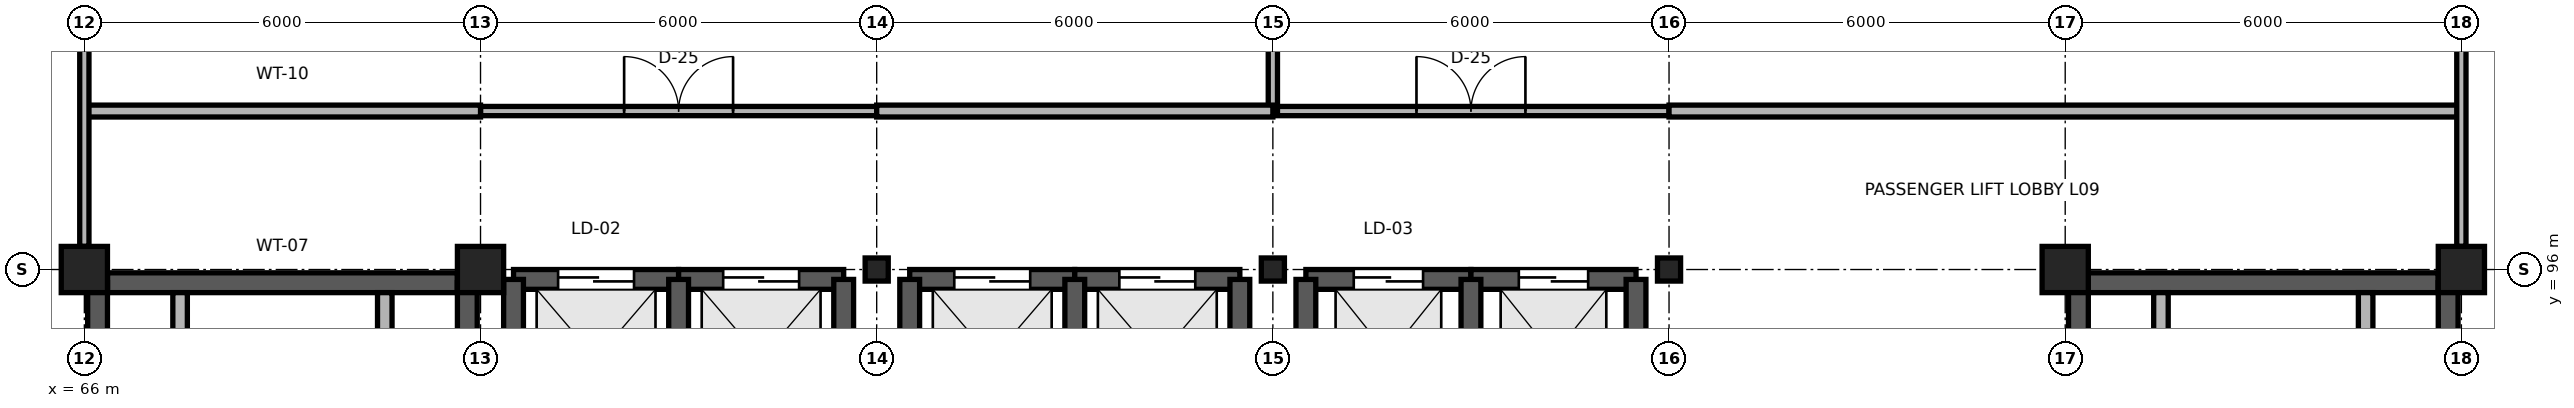
"""IFC4 building model, lengths in metres.
Left out: names, types, materials, properties, quantities, classifications, styles, units other than length and angle.
Written with IfcOpenShell. Run it as: python <this file> out.ifc"""

import sys

from ifc_helpers import new_model, si_unit, direction, frame, frame_2d, origin, origin_2d, place, context, subcontext, project, spatial, rectangle, i_section, extrude, element, fill, save


model = new_model("IFC4")
c1 = context("Model", 3, precision=1e-05, world=origin(), true_north=direction((0.0, 1.0)))
c2 = subcontext(c1, "Body", "Model", "MODEL_VIEW")
j1 = project(units=[si_unit("LENGTHUNIT", "METRE"), si_unit("PLANEANGLEUNIT", "RADIAN")], contexts=[c1])
p1 = place(None, origin())
s1 = spatial("IfcSite", under=j1, at=p1, CompositionType="ELEMENT")
p2 = place(p1, origin())
s2 = spatial("IfcBuilding", under=s1, at=p2, CompositionType="ELEMENT")
p3 = place(p2, frame((0.0, 0.0, 36.6)))
s3 = spatial("IfcBuildingStorey", under=s2, at=p3, CompositionType="ELEMENT", Elevation=36.6)
for number, where, z_axis, x_axis in (
    (1, (66.0, 96.0, 0.0), (0.0, 0.0, 1.0), (1.0, 0.0, 0.0)),
    (2, (72.0, 96.0, 0.0), (0.0, 0.0, 1.0), (1.0, 0.0, 0.0)),
):
    element("IfcColumn", number, at=place(p3, frame(where, z_axis=z_axis, x_axis=x_axis)), inside=s3, PredefinedType="COLUMN", context=c2, shape_type="SweptSolid", body=[
        extrude(rectangle(XDim=0.7, YDim=0.7, at=origin_2d()), origin(), (0.0, 0.0, 1.0), 3.9),
    ])
for number, where, z_axis, x_axis in (
    (3, (78.0, 96.0, 0.0), (0.0, 0.0, 1.0), (1.0, 0.0, 0.0)),
    (4, (84.0, 96.0, 0.0), (0.0, 0.0, 1.0), (1.0, 0.0, 0.0)),
    (5, (90.0, 96.0, 0.0), (0.0, 0.0, 1.0), (1.0, 0.0, 0.0)),
):
    element("IfcColumn", number, at=place(p3, frame(where, z_axis=z_axis, x_axis=x_axis)), inside=s3, PredefinedType="COLUMN", context=c2, shape_type="SweptSolid", body=[
        extrude(i_section(OverallWidth=0.35, OverallDepth=0.35, WebThickness=0.012, FlangeThickness=0.019, FilletRadius=0.02, at=origin_2d()), origin(), (0.0, 0.0, 1.0), 3.9),
    ])
for number, where, z_axis, x_axis in (
    (6, (96.0, 96.0, 0.0), (0.0, 0.0, 1.0), (1.0, 0.0, 0.0)),
    (7, (102.0, 96.0, 0.0), (0.0, 0.0, 1.0), (1.0, 0.0, 0.0)),
):
    element("IfcColumn", number, at=place(p3, frame(where, z_axis=z_axis, x_axis=x_axis)), inside=s3, PredefinedType="COLUMN", context=c2, shape_type="SweptSolid", body=[
        extrude(rectangle(XDim=0.7, YDim=0.7, at=origin_2d()), origin(), (0.0, 0.0, 1.0), 3.9),
    ])
p4 = place(p3, frame((66.35, 95.8, 0.0), z_axis=(0.0, 0.0, 1.0), x_axis=(1.0, 0.0, 0.0)))
e8 = element("IfcWall", 8, at=p4, inside=s3, PredefinedType="SHEAR", context=c2, shape_type="SweptSolid", body=[
    extrude(rectangle(XDim=5.3, YDim=0.3, at=frame_2d((2.65, 0.0))), origin(), (0.0, 0.0, 1.0), 3.74),
])
for number, where, z_axis, x_axis in (
    (9, (66.2, 84.0, 0.0), (0.0, 0.0, 1.0), (0.0, 1.0, 0.0)),
    (10, (71.8, 84.0, 0.0), (0.0, 0.0, 1.0), (0.0, 1.0, 0.0)),
):
    element("IfcWall", number, at=place(p3, frame(where, z_axis=z_axis, x_axis=x_axis)), inside=s3, PredefinedType="SHEAR", context=c2, shape_type="SweptSolid", body=[
        extrude(rectangle(XDim=11.8, YDim=0.3, at=frame_2d((5.9, 0.0))), origin(), (0.0, 0.0, 1.0), 3.74),
    ])
for number, where, z_axis, x_axis in (
    (11, (67.45, 94.4, 0.0), (0.0, 0.0, 1.0), (0.0, 1.0, 0.0)),
    (12, (70.55, 94.4, 0.0), (0.0, 0.0, 1.0), (0.0, 1.0, 0.0)),
):
    element("IfcWall", number, at=place(p3, frame(where, z_axis=z_axis, x_axis=x_axis)), inside=s3, PredefinedType="PARTITIONING", context=c2, shape_type="SweptSolid", body=[
        extrude(rectangle(XDim=1.25, YDim=0.22, at=frame_2d((0.625, 0.0))), origin(), (0.0, 0.0, 1.0), 3.74),
    ])
p5 = place(p3, frame((96.35, 95.8, 0.0), z_axis=(0.0, 0.0, 1.0), x_axis=(1.0, 0.0, 0.0)))
e13 = element("IfcWall", 13, at=p5, inside=s3, PredefinedType="SHEAR", context=c2, shape_type="SweptSolid", body=[
    extrude(rectangle(XDim=5.3, YDim=0.3, at=frame_2d((2.65, 0.0))), origin(), (0.0, 0.0, 1.0), 3.74),
])
for number, where, z_axis, x_axis in (
    (14, (96.2, 84.0, 0.0), (0.0, 0.0, 1.0), (0.0, 1.0, 0.0)),
    (15, (101.8, 84.0, 0.0), (0.0, 0.0, 1.0), (0.0, 1.0, 0.0)),
):
    element("IfcWall", number, at=place(p3, frame(where, z_axis=z_axis, x_axis=x_axis)), inside=s3, PredefinedType="SHEAR", context=c2, shape_type="SweptSolid", body=[
        extrude(rectangle(XDim=11.8, YDim=0.3, at=frame_2d((5.9, 0.0))), origin(), (0.0, 0.0, 1.0), 3.74),
    ])
for number, where, z_axis, x_axis in (
    (16, (97.45, 94.4, 0.0), (0.0, 0.0, 1.0), (0.0, 1.0, 0.0)),
    (17, (100.55, 94.4, 0.0), (0.0, 0.0, 1.0), (0.0, 1.0, 0.0)),
):
    element("IfcWall", number, at=place(p3, frame(where, z_axis=z_axis, x_axis=x_axis)), inside=s3, PredefinedType="PARTITIONING", context=c2, shape_type="SweptSolid", body=[
        extrude(rectangle(XDim=1.25, YDim=0.22, at=frame_2d((0.625, 0.0))), origin(), (0.0, 0.0, 1.0), 3.74),
    ])
p6 = place(p3, frame((72.5, 95.85, 0.0), z_axis=(0.0, 0.0, 1.0), x_axis=(1.0, 0.0, 0.0)))
e18 = element("IfcWall", 18, at=p6, inside=s3, PredefinedType="SHEAR", context=c2, shape_type="SweptSolid", body=[
    extrude(rectangle(XDim=2.5, YDim=0.3, at=frame_2d((1.25, 0.0))), origin(), (0.0, 0.0, 1.0), 3.74),
])
p7 = place(p6, frame((0.675, 0.0, 0.0)))
e19 = element("IfcOpeningElement", 19, at=p7, cuts=e18, PredefinedType="OPENING", context=c2, shape_type="SweptSolid", body=[
    extrude(rectangle(XDim=1.15, YDim=2.15, at=frame_2d((0.575, 1.075))), frame((0.0, 0.165, 0.0), z_axis=(0.0, -1.0, 0.0), x_axis=(1.0, 0.0, 0.0)), (0.0, 0.0, 1.0), 0.33),
])
p8 = place(p3, frame((72.5, 92.45, 0.0), z_axis=(0.0, 0.0, 1.0), x_axis=(0.0, 1.0, 0.0)))
e20 = element("IfcWall", 20, at=p8, inside=s3, PredefinedType="SHEAR", context=c2, shape_type="SweptSolid", body=[
    extrude(rectangle(XDim=3.4, YDim=0.3, at=frame_2d((1.7, 0.0))), origin(), (0.0, 0.0, 1.0), 3.74),
])
p9 = place(p3, frame((75.0, 95.85, 0.0), z_axis=(0.0, 0.0, 1.0), x_axis=(1.0, 0.0, 0.0)))
e21 = element("IfcWall", 21, at=p9, inside=s3, PredefinedType="SHEAR", context=c2, shape_type="SweptSolid", body=[
    extrude(rectangle(XDim=2.5, YDim=0.3, at=frame_2d((1.25, 0.0))), origin(), (0.0, 0.0, 1.0), 3.74),
])
p10 = place(p9, frame((0.675, 0.0, 0.0)))
e22 = element("IfcOpeningElement", 22, at=p10, cuts=e21, PredefinedType="OPENING", context=c2, shape_type="SweptSolid", body=[
    extrude(rectangle(XDim=1.15, YDim=2.15, at=frame_2d((0.575, 1.075))), frame((0.0, 0.165, 0.0), z_axis=(0.0, -1.0, 0.0), x_axis=(1.0, 0.0, 0.0)), (0.0, 0.0, 1.0), 0.33),
])
for number, where, z_axis, x_axis in (
    (23, (75.0, 92.45, 0.0), (0.0, 0.0, 1.0), (0.0, 1.0, 0.0)),
    (24, (77.5, 92.45, 0.0), (0.0, 0.0, 1.0), (0.0, 1.0, 0.0)),
):
    element("IfcWall", number, at=place(p3, frame(where, z_axis=z_axis, x_axis=x_axis)), inside=s3, PredefinedType="SHEAR", context=c2, shape_type="SweptSolid", body=[
        extrude(rectangle(XDim=3.4, YDim=0.3, at=frame_2d((1.7, 0.0))), origin(), (0.0, 0.0, 1.0), 3.74),
    ])
p11 = place(p3, frame((78.5, 95.85, 0.0), z_axis=(0.0, 0.0, 1.0), x_axis=(1.0, 0.0, 0.0)))
e25 = element("IfcWall", 25, at=p11, inside=s3, PredefinedType="SHEAR", context=c2, shape_type="SweptSolid", body=[
    extrude(rectangle(XDim=2.5, YDim=0.3, at=frame_2d((1.25, 0.0))), origin(), (0.0, 0.0, 1.0), 3.74),
])
p12 = place(p11, frame((0.675, 0.0, 0.0)))
e26 = element("IfcOpeningElement", 26, at=p12, cuts=e25, PredefinedType="OPENING", context=c2, shape_type="SweptSolid", body=[
    extrude(rectangle(XDim=1.15, YDim=2.15, at=frame_2d((0.575, 1.075))), frame((0.0, 0.165, 0.0), z_axis=(0.0, -1.0, 0.0), x_axis=(1.0, 0.0, 0.0)), (0.0, 0.0, 1.0), 0.33),
])
p13 = place(p3, frame((78.5, 92.45, 0.0), z_axis=(0.0, 0.0, 1.0), x_axis=(0.0, 1.0, 0.0)))
e27 = element("IfcWall", 27, at=p13, inside=s3, PredefinedType="SHEAR", context=c2, shape_type="SweptSolid", body=[
    extrude(rectangle(XDim=3.4, YDim=0.3, at=frame_2d((1.7, 0.0))), origin(), (0.0, 0.0, 1.0), 3.74),
])
p14 = place(p3, frame((81.0, 95.85, 0.0), z_axis=(0.0, 0.0, 1.0), x_axis=(1.0, 0.0, 0.0)))
e28 = element("IfcWall", 28, at=p14, inside=s3, PredefinedType="SHEAR", context=c2, shape_type="SweptSolid", body=[
    extrude(rectangle(XDim=2.5, YDim=0.3, at=frame_2d((1.25, 0.0))), origin(), (0.0, 0.0, 1.0), 3.74),
])
p15 = place(p14, frame((0.675, 0.0, 0.0)))
e29 = element("IfcOpeningElement", 29, at=p15, cuts=e28, PredefinedType="OPENING", context=c2, shape_type="SweptSolid", body=[
    extrude(rectangle(XDim=1.15, YDim=2.15, at=frame_2d((0.575, 1.075))), frame((0.0, 0.165, 0.0), z_axis=(0.0, -1.0, 0.0), x_axis=(1.0, 0.0, 0.0)), (0.0, 0.0, 1.0), 0.33),
])
for number, where, z_axis, x_axis in (
    (30, (81.0, 92.45, 0.0), (0.0, 0.0, 1.0), (0.0, 1.0, 0.0)),
    (31, (83.5, 92.45, 0.0), (0.0, 0.0, 1.0), (0.0, 1.0, 0.0)),
):
    element("IfcWall", number, at=place(p3, frame(where, z_axis=z_axis, x_axis=x_axis)), inside=s3, PredefinedType="SHEAR", context=c2, shape_type="SweptSolid", body=[
        extrude(rectangle(XDim=3.4, YDim=0.3, at=frame_2d((1.7, 0.0))), origin(), (0.0, 0.0, 1.0), 3.74),
    ])
p16 = place(p3, frame((84.5, 95.85, 0.0), z_axis=(0.0, 0.0, 1.0), x_axis=(1.0, 0.0, 0.0)))
e32 = element("IfcWall", 32, at=p16, inside=s3, PredefinedType="SHEAR", context=c2, shape_type="SweptSolid", body=[
    extrude(rectangle(XDim=2.5, YDim=0.3, at=frame_2d((1.25, 0.0))), origin(), (0.0, 0.0, 1.0), 3.74),
])
p17 = place(p16, frame((0.725, 0.0, 0.0)))
e33 = element("IfcOpeningElement", 33, at=p17, cuts=e32, PredefinedType="OPENING", context=c2, shape_type="SweptSolid", body=[
    extrude(rectangle(XDim=1.05, YDim=2.1, at=frame_2d((0.525, 1.05))), frame((0.0, 0.165, 0.0), z_axis=(0.0, -1.0, 0.0), x_axis=(1.0, 0.0, 0.0)), (0.0, 0.0, 1.0), 0.33),
])
p18 = place(p3, frame((84.5, 92.45, 0.0), z_axis=(0.0, 0.0, 1.0), x_axis=(0.0, 1.0, 0.0)))
e34 = element("IfcWall", 34, at=p18, inside=s3, PredefinedType="SHEAR", context=c2, shape_type="SweptSolid", body=[
    extrude(rectangle(XDim=3.4, YDim=0.3, at=frame_2d((1.7, 0.0))), origin(), (0.0, 0.0, 1.0), 3.74),
])
p19 = place(p3, frame((87.0, 95.85, 0.0), z_axis=(0.0, 0.0, 1.0), x_axis=(1.0, 0.0, 0.0)))
e35 = element("IfcWall", 35, at=p19, inside=s3, PredefinedType="SHEAR", context=c2, shape_type="SweptSolid", body=[
    extrude(rectangle(XDim=2.5, YDim=0.3, at=frame_2d((1.25, 0.0))), origin(), (0.0, 0.0, 1.0), 3.74),
])
p20 = place(p19, frame((0.725, 0.0, 0.0)))
e36 = element("IfcOpeningElement", 36, at=p20, cuts=e35, PredefinedType="OPENING", context=c2, shape_type="SweptSolid", body=[
    extrude(rectangle(XDim=1.05, YDim=2.1, at=frame_2d((0.525, 1.05))), frame((0.0, 0.165, 0.0), z_axis=(0.0, -1.0, 0.0), x_axis=(1.0, 0.0, 0.0)), (0.0, 0.0, 1.0), 0.33),
])
for number, where, z_axis, x_axis in (
    (37, (87.0, 92.45, 0.0), (0.0, 0.0, 1.0), (0.0, 1.0, 0.0)),
    (38, (89.5, 92.45, 0.0), (0.0, 0.0, 1.0), (0.0, 1.0, 0.0)),
):
    element("IfcWall", number, at=place(p3, frame(where, z_axis=z_axis, x_axis=x_axis)), inside=s3, PredefinedType="SHEAR", context=c2, shape_type="SweptSolid", body=[
        extrude(rectangle(XDim=3.4, YDim=0.3, at=frame_2d((1.7, 0.0))), origin(), (0.0, 0.0, 1.0), 3.74),
    ])
p21 = place(p3, frame((72.0, 98.4, 0.0), z_axis=(0.0, 0.0, 1.0), x_axis=(1.0, 0.0, 0.0)))
e39 = element("IfcWall", 39, at=p21, inside=s3, PredefinedType="PARTITIONING", context=c2, shape_type="SweptSolid", body=[
    extrude(rectangle(XDim=6.0, YDim=0.14, at=frame_2d((3.0, 0.0))), origin(), (0.0, 0.0, 1.0), 3.74),
])
p22 = place(p21, frame((2.175, 0.0, 0.0)))
e40 = element("IfcOpeningElement", 40, at=p22, cuts=e39, PredefinedType="OPENING", context=c2, shape_type="SweptSolid", body=[
    extrude(rectangle(XDim=1.65, YDim=2.35, at=frame_2d((0.825, 1.175))), frame((0.0, 0.085, 0.0), z_axis=(0.0, -1.0, 0.0), x_axis=(1.0, 0.0, 0.0)), (0.0, 0.0, 1.0), 0.17),
])
p23 = place(p3, frame((84.0, 98.4, 0.0), z_axis=(0.0, 0.0, 1.0), x_axis=(1.0, 0.0, 0.0)))
e41 = element("IfcWall", 41, at=p23, inside=s3, PredefinedType="PARTITIONING", context=c2, shape_type="SweptSolid", body=[
    extrude(rectangle(XDim=6.0, YDim=0.14, at=frame_2d((3.0, 0.0))), origin(), (0.0, 0.0, 1.0), 3.74),
])
p24 = place(p23, frame((2.175, 0.0, 0.0)))
e42 = element("IfcOpeningElement", 42, at=p24, cuts=e41, PredefinedType="OPENING", context=c2, shape_type="SweptSolid", body=[
    extrude(rectangle(XDim=1.65, YDim=2.35, at=frame_2d((0.825, 1.175))), frame((0.0, 0.085, 0.0), z_axis=(0.0, -1.0, 0.0), x_axis=(1.0, 0.0, 0.0)), (0.0, 0.0, 1.0), 0.17),
])
p25 = place(p3, frame((84.0, 98.4, 0.0), z_axis=(0.0, 0.0, 1.0), x_axis=(0.0, 1.0, 0.0)))
e43 = element("IfcWall", 43, at=p25, inside=s3, PredefinedType="PARTITIONING", context=c2, shape_type="SweptSolid", body=[
    extrude(rectangle(XDim=2.95, YDim=0.14, at=frame_2d((1.475, 0.0))), origin(), (0.0, 0.0, 1.0), 3.348),
])
for number, where, z_axis, x_axis in (
    (44, (66.0, 98.4, 0.0), (0.0, 0.0, 1.0), (1.0, 0.0, 0.0)),
    (45, (78.0, 98.4, 0.0), (0.0, 0.0, 1.0), (1.0, 0.0, 0.0)),
):
    element("IfcWall", number, at=place(p3, frame(where, z_axis=z_axis, x_axis=x_axis)), inside=s3, PredefinedType="PARTITIONING", context=c2, shape_type="SweptSolid", body=[
        extrude(rectangle(XDim=6.0, YDim=0.18, at=frame_2d((3.0, 0.0))), origin(), (0.0, 0.0, 1.0), 3.74),
    ])
p26 = place(p3, frame((90.0, 98.4, 0.0), z_axis=(0.0, 0.0, 1.0), x_axis=(1.0, 0.0, 0.0)))
e46 = element("IfcWall", 46, at=p26, inside=s3, PredefinedType="PARTITIONING", context=c2, shape_type="SweptSolid", body=[
    extrude(rectangle(XDim=12.0, YDim=0.18, at=frame_2d((6.0, 0.0))), origin(), (0.0, 0.0, 1.0), 3.74),
])
for number, where, z_axis, x_axis in (
    (47, (66.0, 96.35, 0.0), (0.0, 0.0, 1.0), (0.0, 1.0, 0.0)),
    (48, (102.0, 96.35, 0.0), (0.0, 0.0, 1.0), (0.0, 1.0, 0.0)),
):
    element("IfcWall", number, at=place(p3, frame(where, z_axis=z_axis, x_axis=x_axis)), inside=s3, PredefinedType="PARTITIONING", context=c2, shape_type="SweptSolid", body=[
        extrude(rectangle(XDim=5.3, YDim=0.14, at=frame_2d((2.65, 0.0))), origin(), (0.0, 0.0, 1.0), 3.348),
    ])
p27 = place(p7, origin())
e49 = element("IfcDoor", 49, at=p27, inside=s3, OperationType="DOUBLE_DOOR_SLIDING", PredefinedType="DOOR", context=c2, shape_type="SweptSolid", body=[
    extrude(rectangle(XDim=1.15, YDim=2.15, at=frame_2d((0.575, 1.075))), frame((0.0, 0.025, 0.0), z_axis=(0.0, -1.0, 0.0), x_axis=(1.0, 0.0, 0.0)), (0.0, 0.0, 1.0), 0.05),
])
fill(e19, e49)
p28 = place(p10, origin())
e50 = element("IfcDoor", 50, at=p28, inside=s3, OperationType="DOUBLE_DOOR_SLIDING", PredefinedType="DOOR", context=c2, shape_type="SweptSolid", body=[
    extrude(rectangle(XDim=1.15, YDim=2.15, at=frame_2d((0.575, 1.075))), frame((0.0, 0.025, 0.0), z_axis=(0.0, -1.0, 0.0), x_axis=(1.0, 0.0, 0.0)), (0.0, 0.0, 1.0), 0.05),
])
fill(e22, e50)
p29 = place(p12, origin())
e51 = element("IfcDoor", 51, at=p29, inside=s3, OperationType="DOUBLE_DOOR_SLIDING", PredefinedType="DOOR", context=c2, shape_type="SweptSolid", body=[
    extrude(rectangle(XDim=1.15, YDim=2.15, at=frame_2d((0.575, 1.075))), frame((0.0, 0.025, 0.0), z_axis=(0.0, -1.0, 0.0), x_axis=(1.0, 0.0, 0.0)), (0.0, 0.0, 1.0), 0.05),
])
fill(e26, e51)
p30 = place(p15, origin())
e52 = element("IfcDoor", 52, at=p30, inside=s3, OperationType="DOUBLE_DOOR_SLIDING", PredefinedType="DOOR", context=c2, shape_type="SweptSolid", body=[
    extrude(rectangle(XDim=1.15, YDim=2.15, at=frame_2d((0.575, 1.075))), frame((0.0, 0.025, 0.0), z_axis=(0.0, -1.0, 0.0), x_axis=(1.0, 0.0, 0.0)), (0.0, 0.0, 1.0), 0.05),
])
fill(e29, e52)
p31 = place(p17, origin())
e53 = element("IfcDoor", 53, at=p31, inside=s3, OperationType="DOUBLE_DOOR_SLIDING", PredefinedType="DOOR", context=c2, shape_type="SweptSolid", body=[
    extrude(rectangle(XDim=1.05, YDim=2.1, at=frame_2d((0.525, 1.05))), frame((0.0, 0.025, 0.0), z_axis=(0.0, -1.0, 0.0), x_axis=(1.0, 0.0, 0.0)), (0.0, 0.0, 1.0), 0.05),
])
fill(e33, e53)
p32 = place(p20, origin())
e54 = element("IfcDoor", 54, at=p32, inside=s3, OperationType="DOUBLE_DOOR_SLIDING", PredefinedType="DOOR", context=c2, shape_type="SweptSolid", body=[
    extrude(rectangle(XDim=1.05, YDim=2.1, at=frame_2d((0.525, 1.05))), frame((0.0, 0.025, 0.0), z_axis=(0.0, -1.0, 0.0), x_axis=(1.0, 0.0, 0.0)), (0.0, 0.0, 1.0), 0.05),
])
fill(e36, e54)
p33 = place(p22, origin())
e55 = element("IfcDoor", 55, at=p33, inside=s3, OperationType="DOUBLE_DOOR_SINGLE_SWING", PredefinedType="DOOR", context=c2, shape_type="SweptSolid", body=[
    extrude(rectangle(XDim=1.65, YDim=2.35, at=frame_2d((0.825, 1.175))), frame((0.0, 0.025, 0.0), z_axis=(0.0, -1.0, 0.0), x_axis=(1.0, 0.0, 0.0)), (0.0, 0.0, 1.0), 0.05),
])
fill(e40, e55)
p34 = place(p24, origin())
e56 = element("IfcDoor", 56, at=p34, inside=s3, OperationType="DOUBLE_DOOR_SINGLE_SWING", PredefinedType="DOOR", context=c2, shape_type="SweptSolid", body=[
    extrude(rectangle(XDim=1.65, YDim=2.35, at=frame_2d((0.825, 1.175))), frame((0.0, 0.025, 0.0), z_axis=(0.0, -1.0, 0.0), x_axis=(1.0, 0.0, 0.0)), (0.0, 0.0, 1.0), 0.05),
])
fill(e42, e56)
save(model, sys.argv[1])
